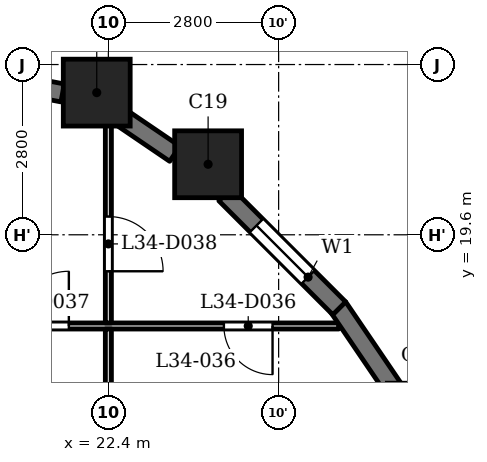
"""IFC4 building model, lengths in metres.
Left out: names, types, materials, properties, quantities, classifications, styles, units other than length and angle.
Written with IfcOpenShell. Run it as: python <this file> out.ifc"""

import sys

from ifc_helpers import new_model, si_unit, direction, frame, frame_2d, origin, origin_2d, place, context, subcontext, project, spatial, rectangle, extrude, element, fill, save


model = new_model("IFC4")
c1 = context("Model", 3, precision=1e-05, world=origin(), true_north=direction((0.0, 1.0)))
c2 = subcontext(c1, "Body", "Model", "MODEL_VIEW")
j1 = project(units=[si_unit("LENGTHUNIT", "METRE"), si_unit("PLANEANGLEUNIT", "RADIAN")], contexts=[c1])
p1 = place(None, origin())
s1 = spatial("IfcSite", under=j1, at=p1, CompositionType="ELEMENT")
p2 = place(p1, origin())
s2 = spatial("IfcBuilding", under=s1, at=p2, CompositionType="ELEMENT")
p3 = place(p2, frame((0.0, 0.0, 136.1)))
s3 = spatial("IfcBuildingStorey", under=s2, at=p3, CompositionType="ELEMENT", Elevation=136.1)
for number, where, z_axis, x_axis in (
    (1, (24.04, 20.76, 0.0), (0.0, 0.0, 1.0), (1.0, 0.0, 0.0)),
    (2, (22.209, 21.938, 0.0), (0.0, 0.0, 1.0), (1.0, 0.0, 0.0)),
):
    element("IfcColumn", number, at=place(p3, frame(where, z_axis=z_axis, x_axis=x_axis)), inside=s3, PredefinedType="COLUMN", context=c2, shape_type="SweptSolid", body=[
        extrude(rectangle(XDim=1.1, YDim=1.1, at=origin_2d()), origin(), (0.0, 0.0, 1.0), 3.5),
    ])
p4 = place(p3, frame((27.138, 17.002, 0.0), z_axis=(0.0, 0.0, 1.0), x_axis=(-0.562075160946, 0.827086158419, 0.0)))
e3 = element("IfcWall", 3, at=p4, inside=s3, PredefinedType="SOLIDWALL", context=c2, shape_type="SweptSolid", body=[
    extrude(rectangle(XDim=1.706, YDim=0.3, at=frame_2d((0.853, 0.0))), origin(), (0.0, 0.0, 1.0), 2.45),
])
p5 = place(p3, frame((26.197, 18.391, 0.0), z_axis=(0.0, 0.0, 1.0), x_axis=(-0.707060717099, 0.707152842274, 0.0)))
e4 = element("IfcWall", 4, at=p5, inside=s3, PredefinedType="SOLIDWALL", context=c2, shape_type="SweptSolid", body=[
    extrude(rectangle(XDim=2.65, YDim=0.3, at=frame_2d((1.325, 0.0))), origin(), (0.0, 0.0, 1.0), 2.45),
])
p6 = place(p5, frame((0.725, 0.0, 0.6)))
e5 = element("IfcOpeningElement", 5, at=p6, cuts=e4, PredefinedType="OPENING", context=c2, shape_type="SweptSolid", body=[
    extrude(rectangle(XDim=1.2, YDim=1.55, at=frame_2d((0.6, 0.775))), frame((0.0, 0.16, 0.0), z_axis=(0.0, -1.0, 0.0), x_axis=(1.0, 0.0, 0.0)), (0.0, 0.0, 1.0), 0.32),
])
p7 = place(p3, frame((23.492, 20.932, 0.0), z_axis=(0.0, 0.0, 1.0), x_axis=(-0.826993959827, 0.562210806023, 0.0)))
e6 = element("IfcWall", 6, at=p7, inside=s3, PredefinedType="SOLIDWALL", context=c2, shape_type="SweptSolid", body=[
    extrude(rectangle(XDim=1.077, YDim=0.3, at=frame_2d((0.539, 0.0))), origin(), (0.0, 0.0, 1.0), 3.2),
])
p8 = place(p3, frame((21.648, 21.933, 0.0), z_axis=(0.0, 0.0, 1.0), x_axis=(-0.982297206936, 0.187329114784, 0.0)))
e7 = element("IfcWall", 7, at=p8, inside=s3, PredefinedType="SOLIDWALL", context=c2, shape_type="SweptSolid", body=[
    extrude(rectangle(XDim=1.706, YDim=0.3, at=frame_2d((0.853, 0.0))), origin(), (0.0, 0.0, 1.0), 2.45),
])
p9 = place(p8, frame((0.453, 0.0, 0.6)))
e8 = element("IfcOpeningElement", 8, at=p9, cuts=e7, PredefinedType="OPENING", context=c2, shape_type="SweptSolid", body=[
    extrude(rectangle(XDim=0.8, YDim=1.55, at=frame_2d((0.4, 0.775))), frame((0.0, 0.16, 0.0), z_axis=(0.0, -1.0, 0.0), x_axis=(1.0, 0.0, 0.0)), (0.0, 0.0, 1.0), 0.32),
])
p10 = place(p3, frame((16.875, 18.1, 0.0), z_axis=(0.0, 0.0, 1.0), x_axis=(1.0, 0.0, 0.0)))
e9 = element("IfcWall", 9, at=p10, inside=s3, PredefinedType="PARTITIONING", context=c2, shape_type="SweptSolid", body=[
    extrude(rectangle(XDim=9.315, YDim=0.1, at=frame_2d((4.658, 0.0))), origin(), (0.0, 0.0, 1.0), 3.2),
])
p11 = place(p10, frame((7.425, 0.0, 0.0)))
e10 = element("IfcOpeningElement", 10, at=p11, cuts=e9, PredefinedType="OPENING", context=c2, shape_type="SweptSolid", body=[
    extrude(rectangle(XDim=0.8, YDim=2.1, at=frame_2d((0.4, 1.05))), frame((0.0, 0.06, 0.0), z_axis=(0.0, -1.0, 0.0), x_axis=(1.0, 0.0, 0.0)), (0.0, 0.0, 1.0), 0.12),
])
p12 = place(p10, frame((3.975, 0.0, 0.0)))
e11 = element("IfcOpeningElement", 11, at=p12, cuts=e9, PredefinedType="OPENING", context=c2, shape_type="SweptSolid", body=[
    extrude(rectangle(XDim=0.9, YDim=2.1, at=frame_2d((0.45, 1.05))), frame((0.0, 0.06, 0.0), z_axis=(0.0, -1.0, 0.0), x_axis=(1.0, 0.0, 0.0)), (0.0, 0.0, 1.0), 0.12),
])
p13 = place(p3, frame((22.4, 15.475, 0.0), z_axis=(0.0, 0.0, 1.0), x_axis=(0.0, 1.0, 0.0)))
e12 = element("IfcWall", 12, at=p13, inside=s3, PredefinedType="PARTITIONING", context=c2, shape_type="SweptSolid", body=[
    extrude(rectangle(XDim=2.575, YDim=0.1, at=frame_2d((1.288, 0.0))), origin(), (0.0, 0.0, 1.0), 3.2),
])
p14 = place(p3, frame((22.4, 18.15, 0.0), z_axis=(0.0, 0.0, 1.0), x_axis=(0.0, 1.0, 0.0)))
e13 = element("IfcWall", 13, at=p14, inside=s3, PredefinedType="PARTITIONING", context=c2, shape_type="SweptSolid", body=[
    extrude(rectangle(XDim=3.57, YDim=0.1, at=frame_2d((1.785, 0.0))), origin(), (0.0, 0.0, 1.0), 3.2),
])
p15 = place(p14, frame((0.85, 0.0, 0.0)))
e14 = element("IfcOpeningElement", 14, at=p15, cuts=e13, PredefinedType="OPENING", context=c2, shape_type="SweptSolid", body=[
    extrude(rectangle(XDim=0.9, YDim=2.1, at=frame_2d((0.45, 1.05))), frame((0.0, 0.06, 0.0), z_axis=(0.0, -1.0, 0.0), x_axis=(1.0, 0.0, 0.0)), (0.0, 0.0, 1.0), 0.12),
])
p16 = place(p11, origin())
e15 = element("IfcDoor", 15, at=p16, inside=s3, OperationType="SINGLE_SWING_RIGHT", PredefinedType="DOOR", context=c2, shape_type="SweptSolid", body=[
    extrude(rectangle(XDim=0.8, YDim=2.1, at=frame_2d((0.4, 1.05))), frame((0.0, 0.025, 0.0), z_axis=(0.0, -1.0, 0.0), x_axis=(1.0, 0.0, 0.0)), (0.0, 0.0, 1.0), 0.05),
])
fill(e10, e15)
p17 = place(p12, origin())
e16 = element("IfcDoor", 16, at=p17, inside=s3, OperationType="SINGLE_SWING_LEFT", PredefinedType="DOOR", context=c2, shape_type="SweptSolid", body=[
    extrude(rectangle(XDim=0.9, YDim=2.1, at=frame_2d((0.45, 1.05))), frame((0.0, 0.025, 0.0), z_axis=(0.0, -1.0, 0.0), x_axis=(1.0, 0.0, 0.0)), (0.0, 0.0, 1.0), 0.05),
])
fill(e11, e16)
p18 = place(p15, origin())
e17 = element("IfcDoor", 17, at=p18, inside=s3, OperationType="SINGLE_SWING_LEFT", PredefinedType="DOOR", context=c2, shape_type="SweptSolid", body=[
    extrude(rectangle(XDim=0.9, YDim=2.1, at=frame_2d((0.45, 1.05))), frame((0.0, 0.025, 0.0), z_axis=(0.0, -1.0, 0.0), x_axis=(1.0, 0.0, 0.0)), (0.0, 0.0, 1.0), 0.05),
])
fill(e14, e17)
p19 = place(p6, origin())
e18 = element("IfcWindow", 18, at=p19, inside=s3, PartitioningType="SINGLE_PANEL", PredefinedType="WINDOW", context=c2, shape_type="SweptSolid", body=[
    extrude(rectangle(XDim=1.2, YDim=1.55, at=frame_2d((0.6, 0.775))), frame((0.0, 0.03, 0.0), z_axis=(0.0, -1.0, 0.0), x_axis=(1.0, 0.0, 0.0)), (0.0, 0.0, 1.0), 0.06),
])
fill(e5, e18)
save(model, sys.argv[1])
